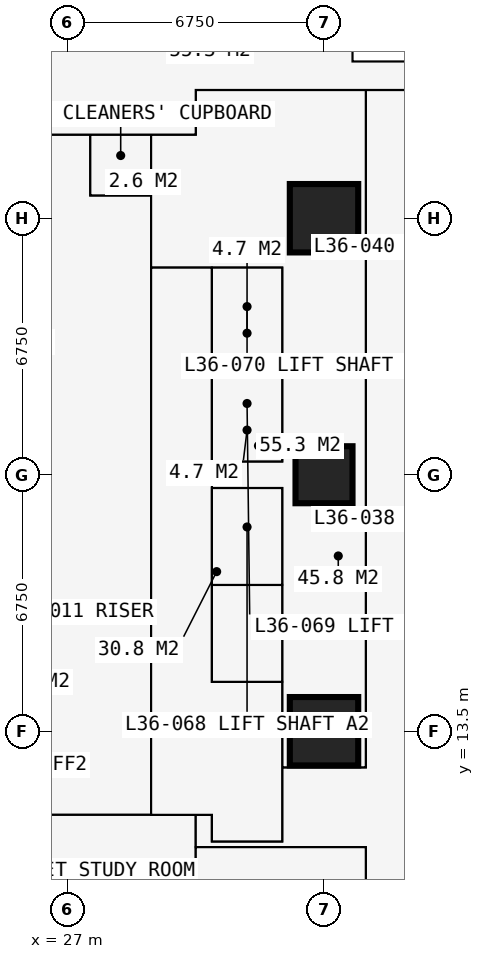
"""IFC4 building model, lengths in metres.
Left out: names, types, materials, properties, quantities, classifications, styles, units other than length and angle.
Written with IfcOpenShell. Run it as: python <this file> out.ifc"""

import sys

from ifc_helpers import new_model, si_unit, direction, frame, frame_2d, origin, origin_2d, place, context, subcontext, project, spatial, rectangle, extrude, element, fill, save


model = new_model("IFC4")
c1 = context("Model", 3, precision=1e-05, world=origin(), true_north=direction((0.0, 1.0)))
c2 = subcontext(c1, "Body", "Model", "MODEL_VIEW")
j1 = project(units=[si_unit("LENGTHUNIT", "METRE"), si_unit("PLANEANGLEUNIT", "RADIAN")], contexts=[c1])
p1 = place(None, origin())
s1 = spatial("IfcSite", under=j1, at=p1, CompositionType="ELEMENT")
p2 = place(p1, origin())
s2 = spatial("IfcBuilding", under=s1, at=p2, CompositionType="ELEMENT")
p3 = place(p2, frame((0.0, 0.0, 134.1)))
s3 = spatial("IfcBuildingStorey", under=s2, at=p3, CompositionType="ELEMENT", Elevation=134.1)
p4 = place(p3, frame((33.75, 13.5, 0.0), z_axis=(0.0, 0.0, 1.0), x_axis=(1.0, 0.0, 0.0)))
e1 = element("IfcColumn", 1, at=p4, inside=s3, PredefinedType="COLUMN", context=c2, shape_type="SweptSolid", body=[
    extrude(rectangle(XDim=1.8, YDim=1.8, at=origin_2d()), origin(), (0.0, 0.0, 1.0), 3.6),
])
p5 = place(p3, frame((33.75, 20.25, 0.0), z_axis=(0.0, 0.0, 1.0), x_axis=(1.0, 0.0, 0.0)))
e2 = element("IfcColumn", 2, at=p5, inside=s3, PredefinedType="COLUMN", context=c2, shape_type="SweptSolid", body=[
    extrude(rectangle(XDim=1.5, YDim=1.5, at=origin_2d()), origin(), (0.0, 0.0, 1.0), 3.6),
])
p6 = place(p3, frame((33.75, 27.0, 0.0), z_axis=(0.0, 0.0, 1.0), x_axis=(1.0, 0.0, 0.0)))
e3 = element("IfcColumn", 3, at=p6, inside=s3, PredefinedType="COLUMN", context=c2, shape_type="SweptSolid", body=[
    extrude(rectangle(XDim=1.8, YDim=1.8, at=origin_2d()), origin(), (0.0, 0.0, 1.0), 3.6),
])
p7 = place(p3, frame((12.9, 13.5, 0.0), z_axis=(0.0, 0.0, 1.0), x_axis=(1.0, 0.0, 0.0)))
e4 = element("IfcWall", 4, at=p7, inside=s3, PredefinedType="SHEAR", context=c2, shape_type="SweptSolid", body=[
    extrude(rectangle(XDim=14.7, YDim=1.2, at=frame_2d((7.35, 0.0))), origin(), (0.0, 0.0, 1.0), 3.6),
])
p8 = place(p3, frame((27.0, 14.1, 0.0), z_axis=(0.0, 0.0, 1.0), x_axis=(0.0, 1.0, 0.0)))
e5 = element("IfcWall", 5, at=p8, inside=s3, PredefinedType="SHEAR", context=c2, shape_type="SweptSolid", body=[
    extrude(rectangle(XDim=12.3, YDim=1.2, at=frame_2d((6.15, 0.0))), origin(), (0.0, 0.0, 1.0), 3.6),
])
p9 = place(p8, frame((3.65, 0.0, 0.0)))
e6 = element("IfcOpeningElement", 6, at=p9, cuts=e5, PredefinedType="OPENING", context=c2, shape_type="SweptSolid", body=[
    extrude(rectangle(XDim=1.2, YDim=2.2, at=frame_2d((0.6, 1.1))), frame((0.0, 0.61, 0.0), z_axis=(0.0, -1.0, 0.0), x_axis=(1.0, 0.0, 0.0)), (0.0, 0.0, 1.0), 1.22),
])
p10 = place(p3, frame((27.6, 27.0, 0.0), z_axis=(0.0, 0.0, 1.0), x_axis=(-1.0, 0.0, 0.0)))
e7 = element("IfcWall", 7, at=p10, inside=s3, PredefinedType="SHEAR", context=c2, shape_type="SweptSolid", body=[
    extrude(rectangle(XDim=14.7, YDim=1.2, at=frame_2d((7.35, 0.0))), origin(), (0.0, 0.0, 1.0), 3.6),
])
p11 = place(p10, frame((5.225, 0.0, 0.0)))
e8 = element("IfcOpeningElement", 8, at=p11, cuts=e7, PredefinedType="OPENING", context=c2, shape_type="SweptSolid", body=[
    extrude(rectangle(XDim=0.9, YDim=2.2, at=frame_2d((0.45, 1.1))), frame((0.0, 0.61, 0.0), z_axis=(0.0, -1.0, 0.0), x_axis=(1.0, 0.0, 0.0)), (0.0, 0.0, 1.0), 1.22),
])
p12 = place(p10, frame((8.2, 0.0, 0.0)))
e9 = element("IfcOpeningElement", 9, at=p12, cuts=e7, PredefinedType="OPENING", context=c2, shape_type="SweptSolid", body=[
    extrude(rectangle(XDim=1.0, YDim=2.2, at=frame_2d((0.5, 1.1))), frame((0.0, 0.61, 0.0), z_axis=(0.0, -1.0, 0.0), x_axis=(1.0, 0.0, 0.0)), (0.0, 0.0, 1.0), 1.22),
])
p13 = place(p3, frame((37.875, 31.125, 0.0), z_axis=(0.0, 0.0, 1.0), x_axis=(-1.0, 0.0, 0.0)))
e10 = element("IfcWall", 10, at=p13, inside=s3, PredefinedType="SOLIDWALL", context=c2, shape_type="SweptSolid", body=[
    extrude(rectangle(XDim=3.375, YDim=0.3, at=frame_2d((1.688, 0.0))), origin(), (0.0, 0.0, 1.0), 3.3),
])
p14 = place(p13, frame((0.788, 0.0, 0.6)))
e11 = element("IfcOpeningElement", 11, at=p14, cuts=e10, PredefinedType="OPENING", context=c2, shape_type="SweptSolid", body=[
    extrude(rectangle(XDim=1.8, YDim=2.1, at=frame_2d((0.9, 1.05))), frame((0.0, 0.16, 0.0), z_axis=(0.0, -1.0, 0.0), x_axis=(1.0, 0.0, 0.0)), (0.0, 0.0, 1.0), 0.32),
])
p15 = place(p3, frame((34.5, 31.125, 0.0), z_axis=(0.0, 0.0, 1.0), x_axis=(0.0, 1.0, 0.0)))
e12 = element("IfcWall", 12, at=p15, inside=s3, PredefinedType="SOLIDWALL", context=c2, shape_type="SweptSolid", body=[
    extrude(rectangle(XDim=3.375, YDim=0.3, at=frame_2d((1.688, 0.0))), origin(), (0.0, 0.0, 1.0), 3.3),
])
p16 = place(p15, frame((0.268, 0.0, 0.9)))
e13 = element("IfcOpeningElement", 13, at=p16, cuts=e12, PredefinedType="OPENING", context=c2, shape_type="SweptSolid", body=[
    extrude(rectangle(XDim=1.5, YDim=1.8, at=frame_2d((0.75, 0.9))), frame((0.0, 0.16, 0.0), z_axis=(0.0, -1.0, 0.0), x_axis=(1.0, 0.0, 0.0)), (0.0, 0.0, 1.0), 0.32),
])
p17 = place(p3, frame((10.125, 11.3, 0.0), z_axis=(0.0, 0.0, 1.0), x_axis=(1.0, 0.0, 0.0)))
e14 = element("IfcWall", 14, at=p17, inside=s3, PredefinedType="PARTITIONING", context=c2, shape_type="SweptSolid", body=[
    extrude(rectangle(XDim=20.675, YDim=0.15, at=frame_2d((10.337, 0.0))), origin(), (0.0, 0.0, 1.0), 3.3),
])
p18 = place(p17, frame((8.375, 0.0, 0.0)))
e15 = element("IfcOpeningElement", 15, at=p18, cuts=e14, PredefinedType="OPENING", context=c2, shape_type="SweptSolid", body=[
    extrude(rectangle(XDim=1.0, YDim=2.2, at=frame_2d((0.5, 1.1))), frame((0.0, 0.085, 0.0), z_axis=(0.0, -1.0, 0.0), x_axis=(1.0, 0.0, 0.0)), (0.0, 0.0, 1.0), 0.17),
])
p19 = place(p17, frame((10.975, 0.0, 0.0)))
e16 = element("IfcOpeningElement", 16, at=p19, cuts=e14, PredefinedType="OPENING", context=c2, shape_type="SweptSolid", body=[
    extrude(rectangle(XDim=1.0, YDim=2.2, at=frame_2d((0.5, 1.1))), frame((0.0, 0.085, 0.0), z_axis=(0.0, -1.0, 0.0), x_axis=(1.0, 0.0, 0.0)), (0.0, 0.0, 1.0), 0.17),
])
p20 = place(p17, frame((3.925, 0.0, 0.0)))
e17 = element("IfcOpeningElement", 17, at=p20, cuts=e14, PredefinedType="OPENING", context=c2, shape_type="SweptSolid", body=[
    extrude(rectangle(XDim=0.95, YDim=2.2, at=frame_2d((0.475, 1.1))), frame((0.0, 0.085, 0.0), z_axis=(0.0, -1.0, 0.0), x_axis=(1.0, 0.0, 0.0)), (0.0, 0.0, 1.0), 0.17),
])
p21 = place(p3, frame((11.3, 29.2, 0.0), z_axis=(0.0, 0.0, 1.0), x_axis=(1.0, 0.0, 0.0)))
e18 = element("IfcWall", 18, at=p21, inside=s3, PredefinedType="PARTITIONING", context=c2, shape_type="SweptSolid", body=[
    extrude(rectangle(XDim=19.075, YDim=0.15, at=frame_2d((9.538, 0.0))), origin(), (0.0, 0.0, 1.0), 3.3),
])
p22 = place(p21, frame((5.825, 0.0, 0.0)))
e19 = element("IfcOpeningElement", 19, at=p22, cuts=e18, PredefinedType="OPENING", context=c2, shape_type="SweptSolid", body=[
    extrude(rectangle(XDim=0.95, YDim=2.2, at=frame_2d((0.475, 1.1))), frame((0.0, 0.085, 0.0), z_axis=(0.0, -1.0, 0.0), x_axis=(1.0, 0.0, 0.0)), (0.0, 0.0, 1.0), 0.17),
])
p23 = place(p21, frame((9.2, 0.0, 0.0)))
e20 = element("IfcOpeningElement", 20, at=p23, cuts=e18, PredefinedType="OPENING", context=c2, shape_type="SweptSolid", body=[
    extrude(rectangle(XDim=0.95, YDim=2.2, at=frame_2d((0.475, 1.1))), frame((0.0, 0.085, 0.0), z_axis=(0.0, -1.0, 0.0), x_axis=(1.0, 0.0, 0.0)), (0.0, 0.0, 1.0), 0.17),
])
p24 = place(p21, frame((0.6, 0.0, 0.0)))
e21 = element("IfcOpeningElement", 21, at=p24, cuts=e18, PredefinedType="OPENING", context=c2, shape_type="SweptSolid", body=[
    extrude(rectangle(XDim=1.0, YDim=2.2, at=frame_2d((0.5, 1.1))), frame((0.0, 0.085, 0.0), z_axis=(0.0, -1.0, 0.0), x_axis=(1.0, 0.0, 0.0)), (0.0, 0.0, 1.0), 0.17),
])
p25 = place(p3, frame((27.6, 27.6, 0.0), z_axis=(0.0, 0.0, 1.0), x_axis=(0.0, 1.0, 0.0)))
e22 = element("IfcWall", 22, at=p25, inside=s3, PredefinedType="PARTITIONING", context=c2, shape_type="SweptSolid", body=[
    extrude(rectangle(XDim=1.6, YDim=0.15, at=frame_2d((0.8, 0.0))), origin(), (0.0, 0.0, 1.0), 3.3),
])
p26 = place(p25, frame((0.3, 0.0, 0.0)))
e23 = element("IfcOpeningElement", 23, at=p26, cuts=e22, PredefinedType="OPENING", context=c2, shape_type="SweptSolid", body=[
    extrude(rectangle(XDim=0.95, YDim=2.2, at=frame_2d((0.475, 1.1))), frame((0.0, 0.085, 0.0), z_axis=(0.0, -1.0, 0.0), x_axis=(1.0, 0.0, 0.0)), (0.0, 0.0, 1.0), 0.17),
])
p27 = place(p3, frame((27.6, 27.6, 0.0), z_axis=(0.0, 0.0, 1.0), x_axis=(1.0, 0.0, 0.0)))
e24 = element("IfcWall", 24, at=p27, inside=s3, PredefinedType="PARTITIONING", context=c2, shape_type="SweptSolid", body=[
    extrude(rectangle(XDim=1.6, YDim=0.15, at=frame_2d((0.8, 0.0))), origin(), (0.0, 0.0, 1.0), 2.7),
])
p28 = place(p3, frame((29.2, 11.3, 0.0), z_axis=(0.0, 0.0, 1.0), x_axis=(0.0, 1.0, 0.0)))
e25 = element("IfcWall", 25, at=p28, inside=s3, PredefinedType="PARTITIONING", context=c2, shape_type="SweptSolid", body=[
    extrude(rectangle(XDim=17.9, YDim=0.2, at=frame_2d((8.95, 0.0))), origin(), (0.0, 0.0, 1.0), 3.3),
])
p29 = place(p28, frame((8.35, 0.0, 0.0)))
e26 = element("IfcOpeningElement", 26, at=p29, cuts=e25, PredefinedType="OPENING", context=c2, shape_type="SweptSolid", body=[
    extrude(rectangle(XDim=1.2, YDim=2.2, at=frame_2d((0.6, 1.1))), frame((0.0, 0.11, 0.0), z_axis=(0.0, -1.0, 0.0), x_axis=(1.0, 0.0, 0.0)), (0.0, 0.0, 1.0), 0.22),
])
p30 = place(p3, frame((29.2, 25.7, 0.0), z_axis=(0.0, 0.0, 1.0), x_axis=(1.0, 0.0, 0.0)))
e27 = element("IfcWall", 27, at=p30, inside=s3, PredefinedType="SHEAR", context=c2, shape_type="SweptSolid", body=[
    extrude(rectangle(XDim=3.45, YDim=0.1, at=frame_2d((1.725, 0.0))), origin(), (0.0, 0.0, 1.0), 3.3),
])
p31 = place(p3, frame((30.375, -0.734, 0.0), z_axis=(0.0, 0.0, 1.0), x_axis=(0.0, 1.0, 0.0)))
e28 = element("IfcWall", 28, at=p31, inside=s3, PredefinedType="PARTITIONING", context=c2, shape_type="SweptSolid", body=[
    extrude(rectangle(XDim=12.034, YDim=0.15, at=frame_2d((6.017, 0.0))), origin(), (0.0, 0.0, 1.0), 3.3),
])
p32 = place(p31, frame((5.134, 0.0, 0.0)))
e29 = element("IfcOpeningElement", 29, at=p32, cuts=e28, PredefinedType="OPENING", context=c2, shape_type="SweptSolid", body=[
    extrude(rectangle(XDim=1.0, YDim=2.2, at=frame_2d((0.5, 1.1))), frame((0.0, 0.085, 0.0), z_axis=(0.0, -1.0, 0.0), x_axis=(1.0, 0.0, 0.0)), (0.0, 0.0, 1.0), 0.17),
])
p33 = place(p3, frame((30.375, 10.45, 0.0), z_axis=(0.0, 0.0, 1.0), x_axis=(1.0, 0.0, 0.0)))
e30 = element("IfcWall", 30, at=p33, inside=s3, PredefinedType="PARTITIONING", context=c2, shape_type="SweptSolid", body=[
    extrude(rectangle(XDim=4.475, YDim=0.15, at=frame_2d((2.238, 0.0))), origin(), (0.0, 0.0, 1.0), 3.3),
])
p34 = place(p33, frame((2.35, 0.0, 0.0)))
e31 = element("IfcOpeningElement", 31, at=p34, cuts=e30, PredefinedType="OPENING", context=c2, shape_type="SweptSolid", body=[
    extrude(rectangle(XDim=0.95, YDim=2.2, at=frame_2d((0.475, 1.1))), frame((0.0, 0.085, 0.0), z_axis=(0.0, -1.0, 0.0), x_axis=(1.0, 0.0, 0.0)), (0.0, 0.0, 1.0), 0.17),
])
p35 = place(p3, frame((30.375, 29.2, 0.0), z_axis=(0.0, 0.0, 1.0), x_axis=(0.0, 1.0, 0.0)))
e32 = element("IfcWall", 32, at=p35, inside=s3, PredefinedType="PARTITIONING", context=c2, shape_type="SweptSolid", body=[
    extrude(rectangle(XDim=1.175, YDim=0.15, at=frame_2d((0.587, 0.0))), origin(), (0.0, 0.0, 1.0), 3.3),
])
p36 = place(p3, frame((30.375, 30.375, 0.0), z_axis=(0.0, 0.0, 1.0), x_axis=(1.0, 0.0, 0.0)))
e33 = element("IfcWall", 33, at=p36, inside=s3, PredefinedType="PARTITIONING", context=c2, shape_type="SweptSolid", body=[
    extrude(rectangle(XDim=7.35, YDim=0.15, at=frame_2d((3.675, 0.0))), origin(), (0.0, 0.0, 1.0), 2.802),
])
p37 = place(p36, frame((5.225, 0.0, 0.0)))
e34 = element("IfcOpeningElement", 34, at=p37, cuts=e33, PredefinedType="OPENING", context=c2, shape_type="SweptSolid", body=[
    extrude(rectangle(XDim=1.0, YDim=2.2, at=frame_2d((0.5, 1.1))), frame((0.0, 0.085, 0.0), z_axis=(0.0, -1.0, 0.0), x_axis=(1.0, 0.0, 0.0)), (0.0, 0.0, 1.0), 0.17),
])
p38 = place(p3, frame((30.8, 10.6, 0.0), z_axis=(0.0, 0.0, 1.0), x_axis=(0.0, 1.0, 0.0)))
e35 = element("IfcWall", 35, at=p38, inside=s3, PredefinedType="PARTITIONING", context=c2, shape_type="SweptSolid", body=[
    extrude(rectangle(XDim=0.7, YDim=0.15, at=frame_2d((0.35, 0.0))), origin(), (0.0, 0.0, 1.0), 3.3),
])
p39 = place(p3, frame((30.8, 10.6, 0.0), z_axis=(0.0, 0.0, 1.0), x_axis=(1.0, 0.0, 0.0)))
e36 = element("IfcWall", 36, at=p39, inside=s3, PredefinedType="PARTITIONING", context=c2, shape_type="SweptSolid", body=[
    extrude(rectangle(XDim=1.85, YDim=0.15, at=frame_2d((0.925, 0.0))), origin(), (0.0, 0.0, 1.0), 3.3),
])
p40 = place(p3, frame((30.8, 14.8, 0.0), z_axis=(0.0, 0.0, 1.0), x_axis=(0.0, 1.0, 0.0)))
e37 = element("IfcWall", 37, at=p40, inside=s3, PredefinedType="PARTITIONING", context=c2, shape_type="SweptSolid", body=[
    extrude(rectangle(XDim=10.9, YDim=0.15, at=frame_2d((5.45, 0.0))), origin(), (0.0, 0.0, 1.0), 3.3),
])
p41 = place(p40, frame((0.75, 0.0, 0.0)))
e38 = element("IfcOpeningElement", 38, at=p41, cuts=e37, PredefinedType="OPENING", context=c2, shape_type="SweptSolid", body=[
    extrude(rectangle(XDim=1.1, YDim=2.2, at=frame_2d((0.55, 1.1))), frame((0.0, 0.085, 0.0), z_axis=(0.0, -1.0, 0.0), x_axis=(1.0, 0.0, 0.0)), (0.0, 0.0, 1.0), 0.17),
])
p42 = place(p40, frame((3.25, 0.0, 0.0)))
e39 = element("IfcOpeningElement", 39, at=p42, cuts=e37, PredefinedType="OPENING", context=c2, shape_type="SweptSolid", body=[
    extrude(rectangle(XDim=1.1, YDim=2.2, at=frame_2d((0.55, 1.1))), frame((0.0, 0.085, 0.0), z_axis=(0.0, -1.0, 0.0), x_axis=(1.0, 0.0, 0.0)), (0.0, 0.0, 1.0), 0.17),
])
p43 = place(p40, frame((6.5, 0.0, 0.0)))
e40 = element("IfcOpeningElement", 40, at=p43, cuts=e37, PredefinedType="OPENING", context=c2, shape_type="SweptSolid", body=[
    extrude(rectangle(XDim=1.1, YDim=2.2, at=frame_2d((0.55, 1.1))), frame((0.0, 0.085, 0.0), z_axis=(0.0, -1.0, 0.0), x_axis=(1.0, 0.0, 0.0)), (0.0, 0.0, 1.0), 0.17),
])
p44 = place(p40, frame((9.05, 0.0, 0.0)))
e41 = element("IfcOpeningElement", 41, at=p44, cuts=e37, PredefinedType="OPENING", context=c2, shape_type="SweptSolid", body=[
    extrude(rectangle(XDim=1.1, YDim=2.2, at=frame_2d((0.55, 1.1))), frame((0.0, 0.085, 0.0), z_axis=(0.0, -1.0, 0.0), x_axis=(1.0, 0.0, 0.0)), (0.0, 0.0, 1.0), 0.17),
])
for number, where, z_axis, x_axis in (
    (42, (30.8, 14.8, 0.0), (0.0, 0.0, 1.0), (1.0, 0.0, 0.0)),
    (43, (30.8, 17.35, 0.0), (0.0, 0.0, 1.0), (1.0, 0.0, 0.0)),
    (44, (30.8, 19.9, 0.0), (0.0, 0.0, 1.0), (1.0, 0.0, 0.0)),
    (45, (30.8, 20.6, 0.0), (0.0, 0.0, 1.0), (1.0, 0.0, 0.0)),
    (46, (30.8, 23.15, 0.0), (0.0, 0.0, 1.0), (1.0, 0.0, 0.0)),
):
    element("IfcWall", number, at=place(p3, frame(where, z_axis=z_axis, x_axis=x_axis)), inside=s3, PredefinedType="SHEAR", context=c2, shape_type="SweptSolid", body=[
        extrude(rectangle(XDim=1.85, YDim=0.1, at=frame_2d((0.925, 0.0))), origin(), (0.0, 0.0, 1.0), 3.3),
    ])
p45 = place(p3, frame((32.65, 10.6, 0.0), z_axis=(0.0, 0.0, 1.0), x_axis=(0.0, 1.0, 0.0)))
e47 = element("IfcWall", 47, at=p45, inside=s3, PredefinedType="SHEAR", context=c2, shape_type="SweptSolid", body=[
    extrude(rectangle(XDim=9.3, YDim=0.1, at=frame_2d((4.65, 0.0))), origin(), (0.0, 0.0, 1.0), 3.3),
])
p46 = place(p45, frame((0.5, 0.0, 0.0)))
e48 = element("IfcOpeningElement", 48, at=p46, cuts=e47, PredefinedType="OPENING", context=c2, shape_type="SweptSolid", body=[
    extrude(rectangle(XDim=1.0, YDim=2.2, at=frame_2d((0.5, 1.1))), frame((0.0, 0.06, 0.0), z_axis=(0.0, -1.0, 0.0), x_axis=(1.0, 0.0, 0.0)), (0.0, 0.0, 1.0), 0.12),
])
p47 = place(p3, frame((32.65, 12.55, 0.0), z_axis=(0.0, 0.0, 1.0), x_axis=(1.0, 0.0, 0.0)))
e49 = element("IfcWall", 49, at=p47, inside=s3, PredefinedType="PARTITIONING", context=c2, shape_type="SweptSolid", body=[
    extrude(rectangle(XDim=2.2, YDim=0.15, at=frame_2d((1.1, 0.0))), origin(), (0.0, 0.0, 1.0), 3.3),
])
p48 = place(p3, frame((32.65, 20.6, 0.0), z_axis=(0.0, 0.0, 1.0), x_axis=(0.0, 1.0, 0.0)))
e50 = element("IfcWall", 50, at=p48, inside=s3, PredefinedType="PARTITIONING", context=c2, shape_type="SweptSolid", body=[
    extrude(rectangle(XDim=5.1, YDim=0.15, at=frame_2d((2.55, 0.0))), origin(), (0.0, 0.0, 1.0), 3.3),
])
p49 = place(p3, frame((34.85, 6.75, 0.0), z_axis=(0.0, 0.0, 1.0), x_axis=(0.0, 1.0, 0.0)))
e51 = element("IfcWall", 51, at=p49, inside=s3, PredefinedType="PARTITIONING", context=c2, shape_type="SweptSolid", body=[
    extrude(rectangle(XDim=3.7, YDim=0.15, at=frame_2d((1.85, 0.0))), origin(), (0.0, 0.0, 1.0), 3.3),
])
p50 = place(p3, frame((34.85, 12.55, 0.0), z_axis=(0.0, 0.0, 1.0), x_axis=(0.0, 1.0, 0.0)))
e52 = element("IfcWall", 52, at=p50, inside=s3, PredefinedType="PARTITIONING", context=c2, shape_type="SweptSolid", body=[
    extrude(rectangle(XDim=17.825, YDim=0.15, at=frame_2d((8.913, 0.0))), origin(), (0.0, 0.0, 1.0), 3.3),
])
p51 = place(p50, frame((8.5, 0.0, 0.0)))
e53 = element("IfcOpeningElement", 53, at=p51, cuts=e52, PredefinedType="OPENING", context=c2, shape_type="SweptSolid", body=[
    extrude(rectangle(XDim=0.95, YDim=2.2, at=frame_2d((0.475, 1.1))), frame((0.0, 0.085, 0.0), z_axis=(0.0, -1.0, 0.0), x_axis=(1.0, 0.0, 0.0)), (0.0, 0.0, 1.0), 0.17),
])
p52 = place(p14, origin())
e54 = element("IfcWindow", 54, at=p52, inside=s3, PartitioningType="SINGLE_PANEL", PredefinedType="WINDOW", context=c2, shape_type="SweptSolid", body=[
    extrude(rectangle(XDim=1.8, YDim=2.1, at=frame_2d((0.9, 1.05))), frame((0.0, 0.03, 0.0), z_axis=(0.0, -1.0, 0.0), x_axis=(1.0, 0.0, 0.0)), (0.0, 0.0, 1.0), 0.06),
])
fill(e11, e54)
p53 = place(p9, origin())
e55 = element("IfcDoor", 55, at=p53, inside=s3, OperationType="DOUBLE_DOOR_SINGLE_SWING", PredefinedType="DOOR", context=c2, shape_type="SweptSolid", body=[
    extrude(rectangle(XDim=1.2, YDim=2.2, at=frame_2d((0.6, 1.1))), frame((0.0, 0.025, 0.0), z_axis=(0.0, -1.0, 0.0), x_axis=(1.0, 0.0, 0.0)), (0.0, 0.0, 1.0), 0.05),
])
fill(e6, e55)
p54 = place(p26, origin())
e56 = element("IfcDoor", 56, at=p54, inside=s3, OperationType="SINGLE_SWING_LEFT", PredefinedType="DOOR", context=c2, shape_type="SweptSolid", body=[
    extrude(rectangle(XDim=0.95, YDim=2.2, at=frame_2d((0.475, 1.1))), frame((0.0, 0.025, 0.0), z_axis=(0.0, -1.0, 0.0), x_axis=(1.0, 0.0, 0.0)), (0.0, 0.0, 1.0), 0.05),
])
fill(e23, e56)
p55 = place(p46, origin())
e57 = element("IfcDoor", 57, at=p55, inside=s3, OperationType="SINGLE_SWING_LEFT", PredefinedType="DOOR", context=c2, shape_type="SweptSolid", body=[
    extrude(rectangle(XDim=1.0, YDim=2.2, at=frame_2d((0.5, 1.1))), frame((0.0, 0.025, 0.0), z_axis=(0.0, -1.0, 0.0), x_axis=(1.0, 0.0, 0.0)), (0.0, 0.0, 1.0), 0.05),
])
fill(e48, e57)
p56 = place(p51, origin())
e58 = element("IfcDoor", 58, at=p56, inside=s3, OperationType="SINGLE_SWING_LEFT", PredefinedType="DOOR", context=c2, shape_type="SweptSolid", body=[
    extrude(rectangle(XDim=0.95, YDim=2.2, at=frame_2d((0.475, 1.1))), frame((0.0, 0.025, 0.0), z_axis=(0.0, -1.0, 0.0), x_axis=(1.0, 0.0, 0.0)), (0.0, 0.0, 1.0), 0.05),
])
fill(e53, e58)
p57 = place(p34, origin())
e59 = element("IfcDoor", 59, at=p57, inside=s3, OperationType="SINGLE_SWING_LEFT", PredefinedType="DOOR", context=c2, shape_type="SweptSolid", body=[
    extrude(rectangle(XDim=0.95, YDim=2.2, at=frame_2d((0.475, 1.1))), frame((0.0, 0.025, 0.0), z_axis=(0.0, -1.0, 0.0), x_axis=(1.0, 0.0, 0.0)), (0.0, 0.0, 1.0), 0.05),
])
fill(e31, e59)
p58 = place(p37, origin())
e60 = element("IfcDoor", 60, at=p58, inside=s3, OperationType="SINGLE_SWING_LEFT", PredefinedType="DOOR", context=c2, shape_type="SweptSolid", body=[
    extrude(rectangle(XDim=1.0, YDim=2.2, at=frame_2d((0.5, 1.1))), frame((0.0, 0.025, 0.0), z_axis=(0.0, -1.0, 0.0), x_axis=(1.0, 0.0, 0.0)), (0.0, 0.0, 1.0), 0.05),
])
fill(e34, e60)
p59 = place(p41, origin())
e61 = element("IfcDoor", 61, at=p59, inside=s3, OperationType="DOUBLE_DOOR_SLIDING", PredefinedType="DOOR", context=c2, shape_type="SweptSolid", body=[
    extrude(rectangle(XDim=1.1, YDim=2.2, at=frame_2d((0.55, 1.1))), frame((0.0, 0.025, 0.0), z_axis=(0.0, -1.0, 0.0), x_axis=(1.0, 0.0, 0.0)), (0.0, 0.0, 1.0), 0.05),
])
fill(e38, e61)
p60 = place(p42, origin())
e62 = element("IfcDoor", 62, at=p60, inside=s3, OperationType="DOUBLE_DOOR_SLIDING", PredefinedType="DOOR", context=c2, shape_type="SweptSolid", body=[
    extrude(rectangle(XDim=1.1, YDim=2.2, at=frame_2d((0.55, 1.1))), frame((0.0, 0.025, 0.0), z_axis=(0.0, -1.0, 0.0), x_axis=(1.0, 0.0, 0.0)), (0.0, 0.0, 1.0), 0.05),
])
fill(e39, e62)
p61 = place(p43, origin())
e63 = element("IfcDoor", 63, at=p61, inside=s3, OperationType="DOUBLE_DOOR_SLIDING", PredefinedType="DOOR", context=c2, shape_type="SweptSolid", body=[
    extrude(rectangle(XDim=1.1, YDim=2.2, at=frame_2d((0.55, 1.1))), frame((0.0, 0.025, 0.0), z_axis=(0.0, -1.0, 0.0), x_axis=(1.0, 0.0, 0.0)), (0.0, 0.0, 1.0), 0.05),
])
fill(e40, e63)
p62 = place(p44, origin())
e64 = element("IfcDoor", 64, at=p62, inside=s3, OperationType="DOUBLE_DOOR_SLIDING", PredefinedType="DOOR", context=c2, shape_type="SweptSolid", body=[
    extrude(rectangle(XDim=1.1, YDim=2.2, at=frame_2d((0.55, 1.1))), frame((0.0, 0.025, 0.0), z_axis=(0.0, -1.0, 0.0), x_axis=(1.0, 0.0, 0.0)), (0.0, 0.0, 1.0), 0.05),
])
fill(e41, e64)
p63 = place(p29, origin())
e65 = element("IfcDoor", 65, at=p63, inside=s3, OperationType="DOUBLE_DOOR_SINGLE_SWING", PredefinedType="DOOR", context=c2, shape_type="SweptSolid", body=[
    extrude(rectangle(XDim=1.2, YDim=2.2, at=frame_2d((0.6, 1.1))), frame((0.0, 0.025, 0.0), z_axis=(0.0, -1.0, 0.0), x_axis=(1.0, 0.0, 0.0)), (0.0, 0.0, 1.0), 0.05),
])
fill(e26, e65)
save(model, sys.argv[1])
